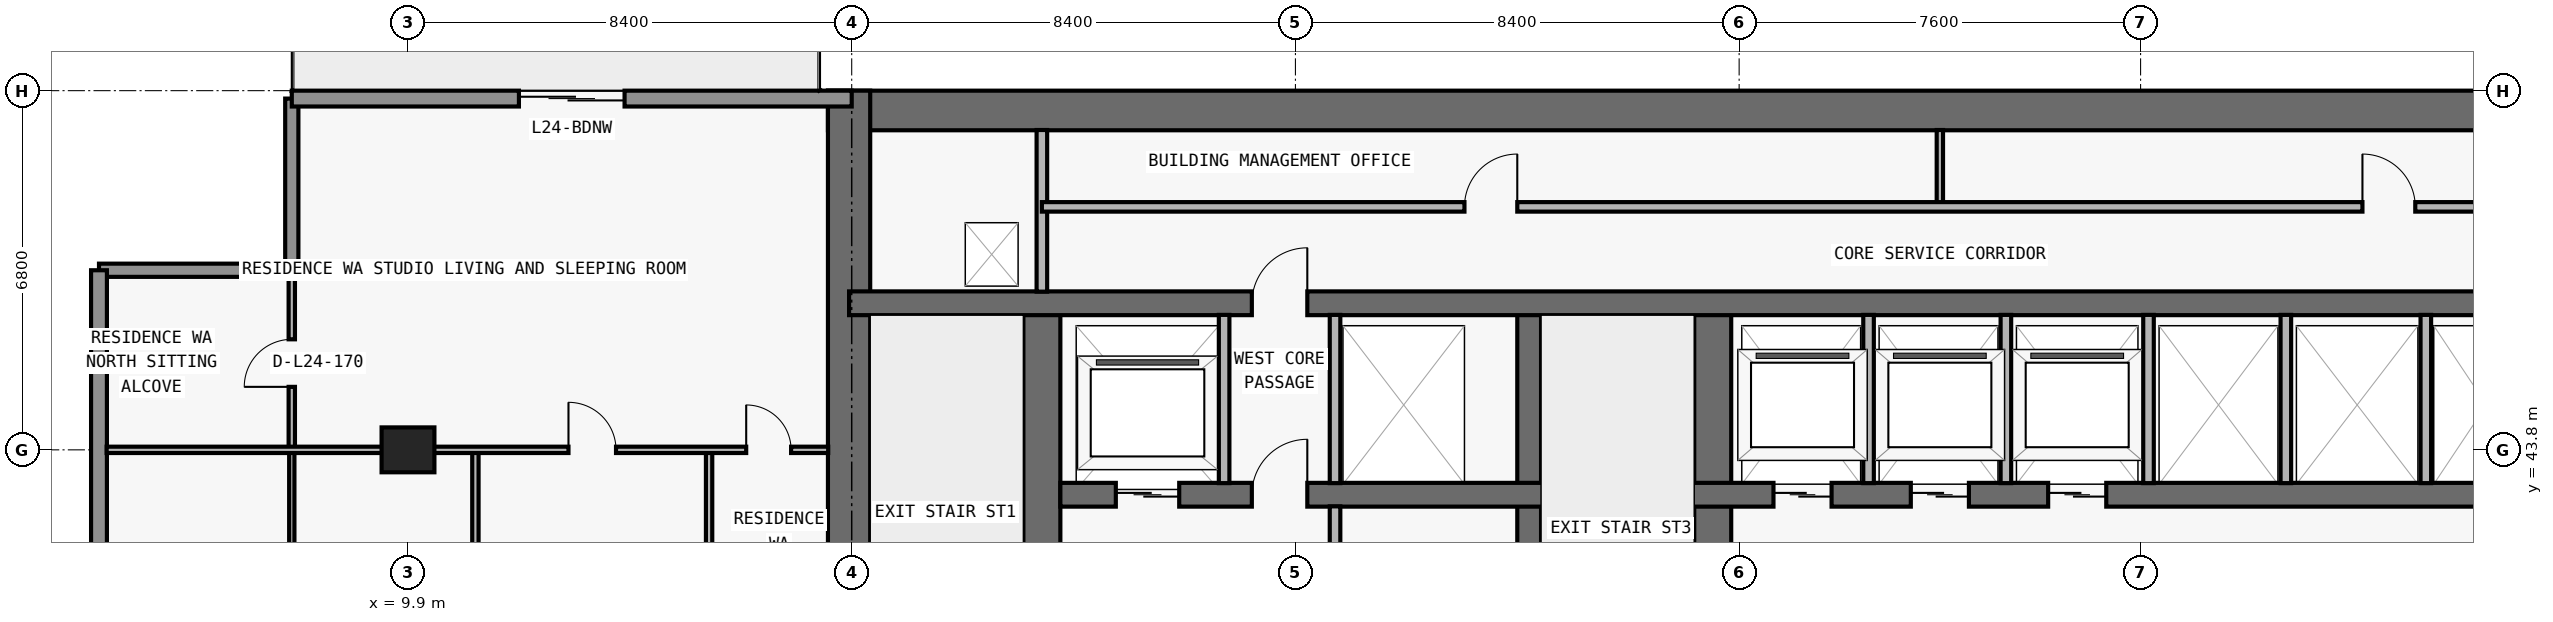
"""IFC4 building model, lengths in metres.
Left out: names, types, materials, properties, quantities, classifications, styles, units other than length and angle.
Written with IfcOpenShell. Run it as: python <this file> out.ifc"""

import sys

from ifc_helpers import new_model, si_unit, direction, frame, frame_2d, origin, origin_2d, place, context, subcontext, project, spatial, rectangle, extrude, element, fill, save


model = new_model("IFC4")
c1 = context("Model", 3, precision=1e-05, world=origin(), true_north=direction((0.0, 1.0)))
c2 = subcontext(c1, "Body", "Model", "MODEL_VIEW")
j1 = project(units=[si_unit("LENGTHUNIT", "METRE"), si_unit("PLANEANGLEUNIT", "RADIAN")], contexts=[c1])
p1 = place(None, origin())
s1 = spatial("IfcSite", under=j1, at=p1, CompositionType="ELEMENT")
p2 = place(p1, origin())
s2 = spatial("IfcBuilding", under=s1, at=p2, CompositionType="ELEMENT")
p3 = place(p2, frame((0.0, 0.0, 91.2)))
s3 = spatial("IfcBuildingStorey", under=s2, at=p3, CompositionType="ELEMENT", Elevation=91.2)
p4 = place(p3, frame((9.9, 43.8, 0.0), z_axis=(0.0, 0.0, 1.0), x_axis=(1.0, 0.0, 0.0)))
e1 = element("IfcColumn", 1, at=p4, inside=s3, PredefinedType="COLUMN", context=c2, shape_type="SweptSolid", body=[
    extrude(rectangle(XDim=1.0, YDim=0.85, at=origin_2d()), origin(), (0.0, 0.0, 1.0), 3.05),
])
p5 = place(p3, frame((17.85, 50.225, 0.0), z_axis=(0.0, 0.0, 1.0), x_axis=(1.0, 0.0, 0.0)))
e2 = element("IfcWall", 2, at=p5, inside=s3, PredefinedType="SHEAR", context=c2, shape_type="SweptSolid", body=[
    extrude(rectangle(XDim=42.1, YDim=0.75, at=frame_2d((21.05, 0.0))), origin(), (0.0, 0.0, 1.0), 3.05),
])
p6 = place(p3, frame((18.25, 36.55, 0.0), z_axis=(0.0, 0.0, 1.0), x_axis=(0.0, 1.0, 0.0)))
e3 = element("IfcWall", 3, at=p6, inside=s3, PredefinedType="SHEAR", context=c2, shape_type="SweptSolid", body=[
    extrude(rectangle(XDim=14.05, YDim=0.8, at=frame_2d((7.025, 0.0))), origin(), (0.0, 0.0, 1.0), 3.05),
])
p7 = place(p3, frame((21.9, 36.95, 0.0), z_axis=(0.0, 0.0, 1.0), x_axis=(0.0, 1.0, 0.0)))
e4 = element("IfcWall", 4, at=p7, inside=s3, PredefinedType="SHEAR", context=c2, shape_type="SweptSolid", body=[
    extrude(rectangle(XDim=9.625, YDim=0.7, at=frame_2d((4.812, 0.0))), origin(), (0.0, 0.0, 1.0), 3.05),
])
p8 = place(p7, frame((0.6, 0.0, 0.0)))
e5 = element("IfcOpeningElement", 5, at=p8, cuts=e4, PredefinedType="OPENING", context=c2, shape_type="SweptSolid", body=[
    extrude(rectangle(XDim=1.1, YDim=2.15, at=frame_2d((0.55, 1.075))), frame((0.0, 0.36, 0.0), z_axis=(0.0, -1.0, 0.0), x_axis=(1.0, 0.0, 0.0)), (0.0, 0.0, 1.0), 0.72),
])
p9 = place(p3, frame((31.125, 36.95, 0.0), z_axis=(0.0, 0.0, 1.0), x_axis=(0.0, 1.0, 0.0)))
e6 = element("IfcWall", 6, at=p9, inside=s3, PredefinedType="SHEAR", context=c2, shape_type="SweptSolid", body=[
    extrude(rectangle(XDim=9.625, YDim=0.45, at=frame_2d((4.812, 0.0))), origin(), (0.0, 0.0, 1.0), 3.05),
])
p10 = place(p3, frame((34.6, 36.95, 0.0), z_axis=(0.0, 0.0, 1.0), x_axis=(0.0, 1.0, 0.0)))
e7 = element("IfcWall", 7, at=p10, inside=s3, PredefinedType="SHEAR", context=c2, shape_type="SweptSolid", body=[
    extrude(rectangle(XDim=9.625, YDim=0.7, at=frame_2d((4.812, 0.0))), origin(), (0.0, 0.0, 1.0), 3.05),
])
p11 = place(p3, frame((22.25, 42.95, 0.0), z_axis=(0.0, 0.0, 1.0), x_axis=(1.0, 0.0, 0.0)))
e8 = element("IfcWall", 8, at=p11, inside=s3, PredefinedType="SHEAR", context=c2, shape_type="SweptSolid", body=[
    extrude(rectangle(XDim=33.3, YDim=0.45, at=frame_2d((16.65, 0.0))), origin(), (0.0, 0.0, 1.0), 3.05),
])
p12 = place(p11, frame((1.05, 0.0, 0.0)))
e9 = element("IfcOpeningElement", 9, at=p12, cuts=e8, PredefinedType="OPENING", context=c2, shape_type="SweptSolid", body=[
    extrude(rectangle(XDim=1.2, YDim=2.2, at=frame_2d((0.6, 1.1))), frame((0.0, 0.235, 0.0), z_axis=(0.0, -1.0, 0.0), x_axis=(1.0, 0.0, 0.0)), (0.0, 0.0, 1.0), 0.47),
])
p13 = place(p11, frame((31.05, 0.0, 0.0)))
e10 = element("IfcOpeningElement", 10, at=p13, cuts=e8, PredefinedType="OPENING", context=c2, shape_type="SweptSolid", body=[
    extrude(rectangle(XDim=1.2, YDim=2.2, at=frame_2d((0.6, 1.1))), frame((0.0, 0.235, 0.0), z_axis=(0.0, -1.0, 0.0), x_axis=(1.0, 0.0, 0.0)), (0.0, 0.0, 1.0), 0.47),
])
p14 = place(p11, frame((13.5, 0.0, 0.0)))
e11 = element("IfcOpeningElement", 11, at=p14, cuts=e8, PredefinedType="OPENING", context=c2, shape_type="SweptSolid", body=[
    extrude(rectangle(XDim=1.1, YDim=2.2, at=frame_2d((0.55, 1.1))), frame((0.0, 0.235, 0.0), z_axis=(0.0, -1.0, 0.0), x_axis=(1.0, 0.0, 0.0)), (0.0, 0.0, 1.0), 0.47),
])
p15 = place(p11, frame((16.1, 0.0, 0.0)))
e12 = element("IfcOpeningElement", 12, at=p15, cuts=e8, PredefinedType="OPENING", context=c2, shape_type="SweptSolid", body=[
    extrude(rectangle(XDim=1.1, YDim=2.2, at=frame_2d((0.55, 1.1))), frame((0.0, 0.235, 0.0), z_axis=(0.0, -1.0, 0.0), x_axis=(1.0, 0.0, 0.0)), (0.0, 0.0, 1.0), 0.47),
])
p16 = place(p11, frame((18.7, 0.0, 0.0)))
e13 = element("IfcOpeningElement", 13, at=p16, cuts=e8, PredefinedType="OPENING", context=c2, shape_type="SweptSolid", body=[
    extrude(rectangle(XDim=1.1, YDim=2.2, at=frame_2d((0.55, 1.1))), frame((0.0, 0.235, 0.0), z_axis=(0.0, -1.0, 0.0), x_axis=(1.0, 0.0, 0.0)), (0.0, 0.0, 1.0), 0.47),
])
p17 = place(p11, frame((3.625, 0.0, 0.0)))
e14 = element("IfcOpeningElement", 14, at=p17, cuts=e8, PredefinedType="OPENING", context=c2, shape_type="SweptSolid", body=[
    extrude(rectangle(XDim=1.05, YDim=2.15, at=frame_2d((0.525, 1.075))), frame((0.0, 0.235, 0.0), z_axis=(0.0, -1.0, 0.0), x_axis=(1.0, 0.0, 0.0)), (0.0, 0.0, 1.0), 0.47),
])
p18 = place(p11, frame((28.675, 0.0, 0.0)))
e15 = element("IfcOpeningElement", 15, at=p18, cuts=e8, PredefinedType="OPENING", context=c2, shape_type="SweptSolid", body=[
    extrude(rectangle(XDim=1.05, YDim=2.15, at=frame_2d((0.525, 1.075))), frame((0.0, 0.235, 0.0), z_axis=(0.0, -1.0, 0.0), x_axis=(1.0, 0.0, 0.0)), (0.0, 0.0, 1.0), 0.47),
])
p19 = place(p3, frame((18.25, 46.575, 0.0), z_axis=(0.0, 0.0, 1.0), x_axis=(1.0, 0.0, 0.0)))
e16 = element("IfcWall", 16, at=p19, inside=s3, PredefinedType="SHEAR", context=c2, shape_type="SweptSolid", body=[
    extrude(rectangle(XDim=41.3, YDim=0.45, at=frame_2d((20.65, 0.0))), origin(), (0.0, 0.0, 1.0), 3.05),
])
p20 = place(p19, frame((7.625, 0.0, 0.0)))
e17 = element("IfcOpeningElement", 17, at=p20, cuts=e16, PredefinedType="OPENING", context=c2, shape_type="SweptSolid", body=[
    extrude(rectangle(XDim=1.05, YDim=2.15, at=frame_2d((0.525, 1.075))), frame((0.0, 0.235, 0.0), z_axis=(0.0, -1.0, 0.0), x_axis=(1.0, 0.0, 0.0)), (0.0, 0.0, 1.0), 0.47),
])
p21 = place(p19, frame((32.675, 0.0, 0.0)))
e18 = element("IfcOpeningElement", 18, at=p21, cuts=e16, PredefinedType="OPENING", context=c2, shape_type="SweptSolid", body=[
    extrude(rectangle(XDim=1.05, YDim=2.15, at=frame_2d((0.525, 1.075))), frame((0.0, 0.235, 0.0), z_axis=(0.0, -1.0, 0.0), x_axis=(1.0, 0.0, 0.0)), (0.0, 0.0, 1.0), 0.47),
])
p22 = place(p3, frame((4.05, 47.2, 0.0), z_axis=(0.0, 0.0, 1.0), x_axis=(1.0, 0.0, 0.0)))
e19 = element("IfcWall", 19, at=p22, inside=s3, PredefinedType="ELEMENTEDWALL", context=c2, shape_type="SweptSolid", body=[
    extrude(rectangle(XDim=3.65, YDim=0.25, at=frame_2d((1.825, 0.0))), origin(), (0.0, 0.0, 1.0), 3.05),
])
p23 = place(p3, frame((7.7, 47.2, 0.0), z_axis=(0.0, 0.0, 1.0), x_axis=(0.0, 1.0, 0.0)))
e20 = element("IfcWall", 20, at=p23, inside=s3, PredefinedType="ELEMENTEDWALL", context=c2, shape_type="SweptSolid", body=[
    extrude(rectangle(XDim=3.25, YDim=0.25, at=frame_2d((1.625, 0.0))), origin(), (0.0, 0.0, 1.0), 3.05),
])
p24 = place(p3, frame((4.05, 28.0, 0.0), z_axis=(0.0, 0.0, 1.0), x_axis=(0.0, 1.0, 0.0)))
e21 = element("IfcWall", 21, at=p24, inside=s3, PredefinedType="STANDARD", context=c2, shape_type="SweptSolid", body=[
    extrude(rectangle(XDim=19.2, YDim=0.3, at=frame_2d((9.6, 0.0))), origin(), (0.0, 0.0, 1.0), 3.05),
])
p25 = place(p3, frame((7.7, 50.45, 0.0), z_axis=(0.0, 0.0, 1.0), x_axis=(1.0, 0.0, 0.0)))
e22 = element("IfcWall", 22, at=p25, inside=s3, PredefinedType="STANDARD", context=c2, shape_type="SweptSolid", body=[
    extrude(rectangle(XDim=10.6, YDim=0.3, at=frame_2d((5.3, 0.0))), origin(), (0.0, 0.0, 1.0), 3.05),
])
p26 = place(p25, frame((4.3, 0.0, 0.0)))
e23 = element("IfcOpeningElement", 23, at=p26, cuts=e22, PredefinedType="OPENING", context=c2, shape_type="SweptSolid", body=[
    extrude(rectangle(XDim=2.0, YDim=2.3, at=frame_2d((1.0, 1.15))), frame((0.0, 0.16, 0.0), z_axis=(0.0, -1.0, 0.0), x_axis=(1.0, 0.0, 0.0)), (0.0, 0.0, 1.0), 0.32),
])
p27 = place(p3, frame((7.7, 36.955, 0.0), z_axis=(0.0, 0.0, 1.0), x_axis=(0.0, 1.0, 0.0)))
e24 = element("IfcWall", 24, at=p27, inside=s3, PredefinedType="MOVABLE", context=c2, shape_type="SweptSolid", body=[
    extrude(rectangle(XDim=6.845, YDim=0.1, at=frame_2d((3.422, 0.0))), origin(), (0.0, 0.0, 1.0), 3.05),
])
p28 = place(p27, frame((2.972, 0.0, 0.0)))
e25 = element("IfcOpeningElement", 25, at=p28, cuts=e24, PredefinedType="OPENING", context=c2, shape_type="SweptSolid", body=[
    extrude(rectangle(XDim=0.9, YDim=2.15, at=frame_2d((0.45, 1.075))), frame((0.0, 0.06, 0.0), z_axis=(0.0, -1.0, 0.0), x_axis=(1.0, 0.0, 0.0)), (0.0, 0.0, 1.0), 0.12),
])
p29 = place(p3, frame((7.7, 43.805, 0.0), z_axis=(0.0, 0.0, 1.0), x_axis=(0.0, 1.0, 0.0)))
e26 = element("IfcWall", 26, at=p29, inside=s3, PredefinedType="PARTITIONING", context=c2, shape_type="SweptSolid", body=[
    extrude(rectangle(XDim=3.275, YDim=0.12, at=frame_2d((1.638, 0.0))), origin(), (0.0, 0.0, 1.0), 3.05),
])
p30 = place(p29, frame((1.188, 0.0, 0.0)))
e27 = element("IfcOpeningElement", 27, at=p30, cuts=e26, PredefinedType="OPENING", context=c2, shape_type="SweptSolid", body=[
    extrude(rectangle(XDim=0.9, YDim=2.15, at=frame_2d((0.45, 1.075))), frame((0.0, 0.07, 0.0), z_axis=(0.0, -1.0, 0.0), x_axis=(1.0, 0.0, 0.0)), (0.0, 0.0, 1.0), 0.14),
])
p31 = place(p3, frame((11.176, 36.95, 0.0), z_axis=(0.0, 0.0, 1.0), x_axis=(0.0, 1.0, 0.0)))
e28 = element("IfcWall", 28, at=p31, inside=s3, PredefinedType="PARTITIONING", context=c2, shape_type="SweptSolid", body=[
    extrude(rectangle(XDim=6.85, YDim=0.12, at=frame_2d((3.425, 0.0))), origin(), (0.0, 0.0, 1.0), 3.05),
])
p32 = place(p31, frame((2.975, 0.0, 0.0)))
e29 = element("IfcOpeningElement", 29, at=p32, cuts=e28, PredefinedType="OPENING", context=c2, shape_type="SweptSolid", body=[
    extrude(rectangle(XDim=0.9, YDim=2.15, at=frame_2d((0.45, 1.075))), frame((0.0, 0.07, 0.0), z_axis=(0.0, -1.0, 0.0), x_axis=(1.0, 0.0, 0.0)), (0.0, 0.0, 1.0), 0.14),
])
p33 = place(p3, frame((15.6, 36.95, 0.0), z_axis=(0.0, 0.0, 1.0), x_axis=(0.0, 1.0, 0.0)))
e30 = element("IfcWall", 30, at=p33, inside=s3, PredefinedType="PARTITIONING", context=c2, shape_type="SweptSolid", body=[
    extrude(rectangle(XDim=6.85, YDim=0.12, at=frame_2d((3.425, 0.0))), origin(), (0.0, 0.0, 1.0), 2.578),
])
p34 = place(p33, frame((1.219, 0.0, 0.0)))
e31 = element("IfcOpeningElement", 31, at=p34, cuts=e30, PredefinedType="OPENING", context=c2, shape_type="SweptSolid", body=[
    extrude(rectangle(XDim=0.85, YDim=2.1, at=frame_2d((0.425, 1.05))), frame((0.0, 0.07, 0.0), z_axis=(0.0, -1.0, 0.0), x_axis=(1.0, 0.0, 0.0)), (0.0, 0.0, 1.0), 0.14),
])
p35 = place(p3, frame((21.9, 46.795, 0.0), z_axis=(0.0, 0.0, 1.0), x_axis=(0.0, 1.0, 0.0)))
e32 = element("IfcWall", 32, at=p35, inside=s3, PredefinedType="PARTITIONING", context=c2, shape_type="SweptSolid", body=[
    extrude(rectangle(XDim=3.06, YDim=0.2, at=frame_2d((1.53, 0.0))), origin(), (0.0, 0.0, 1.0), 3.05),
])
p36 = place(p3, frame((25.35, 43.17, 0.0), z_axis=(0.0, 0.0, 1.0), x_axis=(0.0, 1.0, 0.0)))
e33 = element("IfcWall", 33, at=p36, inside=s3, PredefinedType="PARTITIONING", context=c2, shape_type="SweptSolid", body=[
    extrude(rectangle(XDim=3.185, YDim=0.2, at=frame_2d((1.593, 0.0))), origin(), (0.0, 0.0, 1.0), 3.05),
])
p37 = place(p3, frame((27.45, 37.345, 0.0), z_axis=(0.0, 0.0, 1.0), x_axis=(0.0, 1.0, 0.0)))
e34 = element("IfcWall", 34, at=p37, inside=s3, PredefinedType="PARTITIONING", context=c2, shape_type="SweptSolid", body=[
    extrude(rectangle(XDim=5.385, YDim=0.2, at=frame_2d((2.692, 0.0))), origin(), (0.0, 0.0, 1.0), 3.05),
])
for number, where, z_axis, x_axis in (
    (35, (27.45, 43.17, 0.0), (0.0, 0.0, 1.0), (0.0, 1.0, 0.0)),
    (36, (37.55, 43.17, 0.0), (0.0, 0.0, 1.0), (0.0, 1.0, 0.0)),
):
    element("IfcWall", number, at=place(p3, frame(where, z_axis=z_axis, x_axis=x_axis)), inside=s3, PredefinedType="PARTITIONING", context=c2, shape_type="SweptSolid", body=[
        extrude(rectangle(XDim=3.185, YDim=0.2, at=frame_2d((1.593, 0.0))), origin(), (0.0, 0.0, 1.0), 3.05),
    ])
p38 = place(p3, frame((38.9, 48.4, 0.0), z_axis=(0.0, 0.0, 1.0), x_axis=(0.0, 1.0, 0.0)))
e37 = element("IfcWall", 37, at=p38, inside=s3, PredefinedType="PARTITIONING", context=c2, shape_type="SweptSolid", body=[
    extrude(rectangle(XDim=1.455, YDim=0.12, at=frame_2d((0.728, 0.0))), origin(), (0.0, 0.0, 1.0), 3.05),
])
for number, where, z_axis, x_axis in (
    (38, (40.15, 43.17, 0.0), (0.0, 0.0, 1.0), (0.0, 1.0, 0.0)),
    (39, (42.85, 43.17, 0.0), (0.0, 0.0, 1.0), (0.0, 1.0, 0.0)),
    (40, (45.45, 43.17, 0.0), (0.0, 0.0, 1.0), (0.0, 1.0, 0.0)),
    (41, (48.1, 43.17, 0.0), (0.0, 0.0, 1.0), (0.0, 1.0, 0.0)),
):
    element("IfcWall", number, at=place(p3, frame(where, z_axis=z_axis, x_axis=x_axis)), inside=s3, PredefinedType="PARTITIONING", context=c2, shape_type="SweptSolid", body=[
        extrude(rectangle(XDim=3.185, YDim=0.2, at=frame_2d((1.593, 0.0))), origin(), (0.0, 0.0, 1.0), 3.05),
    ])
p39 = place(p3, frame((4.195, 43.8, 0.0), z_axis=(0.0, 0.0, 1.0), x_axis=(1.0, 0.0, 0.0)))
e42 = element("IfcWall", 42, at=p39, inside=s3, PredefinedType="PARTITIONING", context=c2, shape_type="SweptSolid", body=[
    extrude(rectangle(XDim=13.66, YDim=0.12, at=frame_2d((6.83, 0.0))), origin(), (0.0, 0.0, 1.0), 2.339),
])
p40 = place(p39, frame((8.743, 0.0, 0.0)))
e43 = element("IfcOpeningElement", 43, at=p40, cuts=e42, PredefinedType="OPENING", context=c2, shape_type="SweptSolid", body=[
    extrude(rectangle(XDim=0.9, YDim=2.15, at=frame_2d((0.45, 1.075))), frame((0.0, 0.07, 0.0), z_axis=(0.0, -1.0, 0.0), x_axis=(1.0, 0.0, 0.0)), (0.0, 0.0, 1.0), 0.14),
])
p41 = place(p39, frame((12.107, 0.0, 0.0)))
e44 = element("IfcOpeningElement", 44, at=p41, cuts=e42, PredefinedType="OPENING", context=c2, shape_type="SweptSolid", body=[
    extrude(rectangle(XDim=0.85, YDim=2.1, at=frame_2d((0.425, 1.05))), frame((0.0, 0.07, 0.0), z_axis=(0.0, -1.0, 0.0), x_axis=(1.0, 0.0, 0.0)), (0.0, 0.0, 1.0), 0.14),
])
p42 = place(p3, frame((21.9, 48.4, 0.0), z_axis=(0.0, 0.0, 1.0), x_axis=(1.0, 0.0, 0.0)))
e45 = element("IfcWall", 45, at=p42, inside=s3, PredefinedType="PARTITIONING", context=c2, shape_type="SweptSolid", body=[
    extrude(rectangle(XDim=34.0, YDim=0.18, at=frame_2d((17.0, 0.0))), origin(), (0.0, 0.0, 1.0), 3.05),
])
p43 = place(p42, frame((8.0, 0.0, 0.0)))
e46 = element("IfcOpeningElement", 46, at=p43, cuts=e45, PredefinedType="OPENING", context=c2, shape_type="SweptSolid", body=[
    extrude(rectangle(XDim=1.0, YDim=2.2, at=frame_2d((0.5, 1.1))), frame((0.0, 0.1, 0.0), z_axis=(0.0, -1.0, 0.0), x_axis=(1.0, 0.0, 0.0)), (0.0, 0.0, 1.0), 0.2),
])
p44 = place(p42, frame((25.0, 0.0, 0.0)))
e47 = element("IfcOpeningElement", 47, at=p44, cuts=e45, PredefinedType="OPENING", context=c2, shape_type="SweptSolid", body=[
    extrude(rectangle(XDim=1.0, YDim=2.2, at=frame_2d((0.5, 1.1))), frame((0.0, 0.1, 0.0), z_axis=(0.0, -1.0, 0.0), x_axis=(1.0, 0.0, 0.0)), (0.0, 0.0, 1.0), 0.2),
])
p45 = place(p26, origin())
e48 = element("IfcDoor", 48, at=p45, inside=s3, OperationType="DOUBLE_DOOR_SLIDING", PredefinedType="DOOR", context=c2, shape_type="SweptSolid", body=[
    extrude(rectangle(XDim=2.0, YDim=2.3, at=frame_2d((1.0, 1.15))), frame((0.0, 0.025, 0.0), z_axis=(0.0, -1.0, 0.0), x_axis=(1.0, 0.0, 0.0)), (0.0, 0.0, 1.0), 0.05),
])
fill(e23, e48)
p46 = place(p12, origin())
e49 = element("IfcDoor", 49, at=p46, inside=s3, OperationType="DOUBLE_DOOR_SLIDING", PredefinedType="DOOR", context=c2, shape_type="SweptSolid", body=[
    extrude(rectangle(XDim=1.2, YDim=2.2, at=frame_2d((0.6, 1.1))), frame((0.0, 0.025, 0.0), z_axis=(0.0, -1.0, 0.0), x_axis=(1.0, 0.0, 0.0)), (0.0, 0.0, 1.0), 0.05),
])
fill(e9, e49)
p47 = place(p14, origin())
e50 = element("IfcDoor", 50, at=p47, inside=s3, OperationType="DOUBLE_DOOR_SLIDING", PredefinedType="DOOR", context=c2, shape_type="SweptSolid", body=[
    extrude(rectangle(XDim=1.1, YDim=2.2, at=frame_2d((0.55, 1.1))), frame((0.0, 0.025, 0.0), z_axis=(0.0, -1.0, 0.0), x_axis=(1.0, 0.0, 0.0)), (0.0, 0.0, 1.0), 0.05),
])
fill(e11, e50)
p48 = place(p15, origin())
e51 = element("IfcDoor", 51, at=p48, inside=s3, OperationType="DOUBLE_DOOR_SLIDING", PredefinedType="DOOR", context=c2, shape_type="SweptSolid", body=[
    extrude(rectangle(XDim=1.1, YDim=2.2, at=frame_2d((0.55, 1.1))), frame((0.0, 0.025, 0.0), z_axis=(0.0, -1.0, 0.0), x_axis=(1.0, 0.0, 0.0)), (0.0, 0.0, 1.0), 0.05),
])
fill(e12, e51)
p49 = place(p16, origin())
e52 = element("IfcDoor", 52, at=p49, inside=s3, OperationType="DOUBLE_DOOR_SLIDING", PredefinedType="DOOR", context=c2, shape_type="SweptSolid", body=[
    extrude(rectangle(XDim=1.1, YDim=2.2, at=frame_2d((0.55, 1.1))), frame((0.0, 0.025, 0.0), z_axis=(0.0, -1.0, 0.0), x_axis=(1.0, 0.0, 0.0)), (0.0, 0.0, 1.0), 0.05),
])
fill(e13, e52)
p50 = place(p17, origin())
e53 = element("IfcDoor", 53, at=p50, inside=s3, OperationType="SINGLE_SWING_RIGHT", PredefinedType="DOOR", context=c2, shape_type="SweptSolid", body=[
    extrude(rectangle(XDim=1.05, YDim=2.15, at=frame_2d((0.525, 1.075))), frame((0.0, 0.025, 0.0), z_axis=(0.0, -1.0, 0.0), x_axis=(1.0, 0.0, 0.0)), (0.0, 0.0, 1.0), 0.05),
])
fill(e14, e53)
p51 = place(p20, origin())
e54 = element("IfcDoor", 54, at=p51, inside=s3, OperationType="SINGLE_SWING_RIGHT", PredefinedType="DOOR", context=c2, shape_type="SweptSolid", body=[
    extrude(rectangle(XDim=1.05, YDim=2.15, at=frame_2d((0.525, 1.075))), frame((0.0, 0.025, 0.0), z_axis=(0.0, -1.0, 0.0), x_axis=(1.0, 0.0, 0.0)), (0.0, 0.0, 1.0), 0.05),
])
fill(e17, e54)
p52 = place(p43, origin())
e55 = element("IfcDoor", 55, at=p52, inside=s3, OperationType="SINGLE_SWING_RIGHT", PredefinedType="DOOR", context=c2, shape_type="SweptSolid", body=[
    extrude(rectangle(XDim=1.0, YDim=2.2, at=frame_2d((0.5, 1.1))), frame((0.0, 0.025, 0.0), z_axis=(0.0, -1.0, 0.0), x_axis=(1.0, 0.0, 0.0)), (0.0, 0.0, 1.0), 0.05),
])
fill(e46, e55)
p53 = place(p44, origin())
e56 = element("IfcDoor", 56, at=p53, inside=s3, OperationType="SINGLE_SWING_LEFT", PredefinedType="DOOR", context=c2, shape_type="SweptSolid", body=[
    extrude(rectangle(XDim=1.0, YDim=2.2, at=frame_2d((0.5, 1.1))), frame((0.0, 0.025, 0.0), z_axis=(0.0, -1.0, 0.0), x_axis=(1.0, 0.0, 0.0)), (0.0, 0.0, 1.0), 0.05),
])
fill(e47, e56)
p54 = place(p40, origin())
e57 = element("IfcDoor", 57, at=p54, inside=s3, OperationType="SINGLE_SWING_LEFT", PredefinedType="DOOR", context=c2, shape_type="SweptSolid", body=[
    extrude(rectangle(XDim=0.9, YDim=2.15, at=frame_2d((0.45, 1.075))), frame((0.0, 0.025, 0.0), z_axis=(0.0, -1.0, 0.0), x_axis=(1.0, 0.0, 0.0)), (0.0, 0.0, 1.0), 0.05),
])
fill(e43, e57)
p55 = place(p41, origin())
e58 = element("IfcDoor", 58, at=p55, inside=s3, OperationType="SINGLE_SWING_LEFT", PredefinedType="DOOR", context=c2, shape_type="SweptSolid", body=[
    extrude(rectangle(XDim=0.85, YDim=2.1, at=frame_2d((0.425, 1.05))), frame((0.0, 0.025, 0.0), z_axis=(0.0, -1.0, 0.0), x_axis=(1.0, 0.0, 0.0)), (0.0, 0.0, 1.0), 0.05),
])
fill(e44, e58)
p56 = place(p30, origin())
e59 = element("IfcDoor", 59, at=p56, inside=s3, OperationType="SINGLE_SWING_LEFT", PredefinedType="DOOR", context=c2, shape_type="SweptSolid", body=[
    extrude(rectangle(XDim=0.9, YDim=2.15, at=frame_2d((0.45, 1.075))), frame((0.0, 0.025, 0.0), z_axis=(0.0, -1.0, 0.0), x_axis=(1.0, 0.0, 0.0)), (0.0, 0.0, 1.0), 0.05),
])
fill(e27, e59)
save(model, sys.argv[1])
